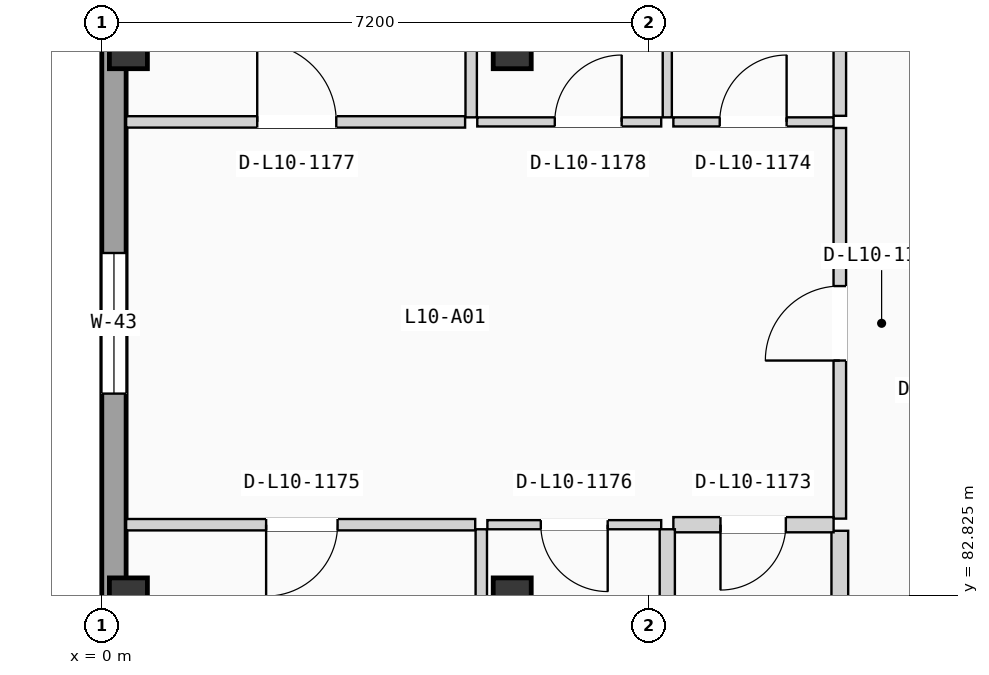
"""IFC4 building model, lengths in metres.
Left out: names, types, materials, properties, quantities, classifications, styles, units other than length and angle.
Written with IfcOpenShell. Run it as: python <this file> out.ifc"""

import sys

from ifc_helpers import new_model, si_unit, direction, frame, frame_2d, origin, origin_2d, place, context, subcontext, project, spatial, rectangle, extrude, element, fill, save


model = new_model("IFC4")
c1 = context("Model", 3, precision=1e-05, world=origin(), true_north=direction((0.0, 1.0)))
c2 = subcontext(c1, "Body", "Model", "MODEL_VIEW")
j1 = project(units=[si_unit("LENGTHUNIT", "METRE"), si_unit("PLANEANGLEUNIT", "RADIAN")], contexts=[c1])
p1 = place(None, origin())
s1 = spatial("IfcSite", under=j1, at=p1, CompositionType="ELEMENT")
p2 = place(p1, origin())
s2 = spatial("IfcBuilding", under=s1, at=p2, CompositionType="ELEMENT")
p3 = place(p2, frame((0.0, 0.0, 34.125)))
s3 = spatial("IfcBuildingStorey", under=s2, at=p3, CompositionType="ELEMENT", Elevation=34.125)
for number, where, z_axis, x_axis in (
    (1, (0.35, 82.8, 0.0), (0.0, 0.0, 1.0), (1.0, 0.0, 0.0)),
    (2, (0.35, 90.0, 0.0), (0.0, 0.0, 1.0), (1.0, 0.0, 0.0)),
    (3, (5.4, 82.8, 0.0), (0.0, 0.0, 1.0), (1.0, 0.0, 0.0)),
    (4, (5.4, 90.0, 0.0), (0.0, 0.0, 1.0), (1.0, 0.0, 0.0)),
):
    element("IfcColumn", number, at=place(p3, frame(where, z_axis=z_axis, x_axis=x_axis)), inside=s3, PredefinedType="COLUMN", context=c2, shape_type="SweptSolid", body=[
        extrude(rectangle(XDim=0.5, YDim=0.5, at=origin_2d()), origin(), (0.0, 0.0, 1.0), 3.15),
    ])
p4 = place(p3, frame((0.16, 68.72, 0.0), z_axis=(0.0, 0.0, 1.0), x_axis=(0.0, 1.0, 0.0)))
e5 = element("IfcWall", 5, at=p4, inside=s3, PredefinedType="SOLIDWALL", context=c2, shape_type="SweptSolid", body=[
    extrude(rectangle(XDim=49.76, YDim=0.32, at=frame_2d((24.88, 0.0))), origin(), (0.0, 0.0, 1.0), 2.89),
])
p5 = place(p4, frame((16.755, 0.0, 0.705)))
e6 = element("IfcOpeningElement", 6, at=p5, cuts=e5, PredefinedType="OPENING", context=c2, shape_type="SweptSolid", body=[
    extrude(rectangle(XDim=1.85, YDim=1.5, at=frame_2d((0.925, 0.75))), frame((0.0, 0.17, 0.0), z_axis=(0.0, -1.0, 0.0), x_axis=(1.0, 0.0, 0.0)), (0.0, 0.0, 1.0), 0.34),
])
p6 = place(p4, frame((9.62, 0.0, 0.555)))
e7 = element("IfcOpeningElement", 7, at=p6, cuts=e5, PredefinedType="OPENING", context=c2, shape_type="SweptSolid", body=[
    extrude(rectangle(XDim=1.85, YDim=1.65, at=frame_2d((0.925, 0.825))), frame((0.0, 0.17, 0.0), z_axis=(0.0, -1.0, 0.0), x_axis=(1.0, 0.0, 0.0)), (0.0, 0.0, 1.0), 0.34),
])
p7 = place(p4, frame((24.405, 0.0, 0.85)))
e8 = element("IfcOpeningElement", 8, at=p7, cuts=e5, PredefinedType="OPENING", context=c2, shape_type="SweptSolid", body=[
    extrude(rectangle(XDim=0.95, YDim=1.2, at=frame_2d((0.475, 0.6))), frame((0.0, 0.17, 0.0), z_axis=(0.0, -1.0, 0.0), x_axis=(1.0, 0.0, 0.0)), (0.0, 0.0, 1.0), 0.34),
])
p8 = place(p4, frame((33.159, 0.0, 0.9)))
e9 = element("IfcOpeningElement", 9, at=p8, cuts=e5, PredefinedType="OPENING", context=c2, shape_type="SweptSolid", body=[
    extrude(rectangle(XDim=2.0, YDim=1.2, at=frame_2d((1.0, 0.6))), frame((0.0, 0.17, 0.0), z_axis=(0.0, -1.0, 0.0), x_axis=(1.0, 0.0, 0.0)), (0.0, 0.0, 1.0), 0.34),
])
p9 = place(p4, frame((29.749, 0.0, 0.855)))
e10 = element("IfcOpeningElement", 10, at=p9, cuts=e5, PredefinedType="OPENING", context=c2, shape_type="SweptSolid", body=[
    extrude(rectangle(XDim=2.0, YDim=1.35, at=frame_2d((1.0, 0.675))), frame((0.0, 0.17, 0.0), z_axis=(0.0, -1.0, 0.0), x_axis=(1.0, 0.0, 0.0)), (0.0, 0.0, 1.0), 0.34),
])
p10 = place(p4, frame((39.352, 0.0, 0.705)))
e11 = element("IfcOpeningElement", 11, at=p10, cuts=e5, PredefinedType="OPENING", context=c2, shape_type="SweptSolid", body=[
    extrude(rectangle(XDim=2.0, YDim=1.5, at=frame_2d((1.0, 0.75))), frame((0.0, 0.17, 0.0), z_axis=(0.0, -1.0, 0.0), x_axis=(1.0, 0.0, 0.0)), (0.0, 0.0, 1.0), 0.34),
])
p11 = place(p3, frame((9.71, 83.83, 0.0), z_axis=(0.0, 0.0, 1.0), x_axis=(0.0, 1.0, 0.0)))
e12 = element("IfcWall", 12, at=p11, inside=s3, PredefinedType="PARTITIONING", context=c2, shape_type="SweptSolid", body=[
    extrude(rectangle(XDim=5.14, YDim=0.165, at=frame_2d((2.57, 0.0))), origin(), (0.0, 0.0, 1.0), 2.87),
])
p12 = place(p11, frame((2.08, 0.0, 0.0)))
e13 = element("IfcOpeningElement", 13, at=p12, cuts=e12, PredefinedType="OPENING", context=c2, shape_type="SweptSolid", body=[
    extrude(rectangle(XDim=0.98, YDim=2.08, at=frame_2d((0.49, 1.04))), frame((0.0, 0.093, 0.0), z_axis=(0.0, -1.0, 0.0), x_axis=(1.0, 0.0, 0.0)), (0.0, 0.0, 1.0), 0.185),
])
p13 = place(p3, frame((9.71, 76.0, 0.0), z_axis=(0.0, 0.0, 1.0), x_axis=(0.0, 1.0, 0.0)))
e14 = element("IfcWall", 14, at=p13, inside=s3, PredefinedType="PLUMBINGWALL", context=c2, shape_type="SweptSolid", body=[
    extrude(rectangle(XDim=7.67, YDim=0.22, at=frame_2d((3.835, 0.0))), origin(), (0.0, 0.0, 1.0), 2.87),
])
p14 = place(p3, frame((9.71, 89.13, 0.0), z_axis=(0.0, 0.0, 1.0), x_axis=(0.0, 1.0, 0.0)))
e15 = element("IfcWall", 15, at=p14, inside=s3, PredefinedType="PARTITIONING", context=c2, shape_type="SweptSolid", body=[
    extrude(rectangle(XDim=7.9, YDim=0.165, at=frame_2d((3.95, 0.0))), origin(), (0.0, 0.0, 1.0), 2.87),
])
p15 = place(p3, frame((7.52, 83.75, 0.0), z_axis=(0.0, 0.0, 1.0), x_axis=(1.0, 0.0, 0.0)))
e16 = element("IfcWall", 16, at=p15, inside=s3, PredefinedType="PLUMBINGWALL", context=c2, shape_type="SweptSolid", body=[
    extrude(rectangle(XDim=2.108, YDim=0.2, at=frame_2d((1.054, 0.0))), origin(), (0.0, 0.0, 1.0), 2.87),
])
p16 = place(p15, frame((0.62, 0.0, 0.0)))
e17 = element("IfcOpeningElement", 17, at=p16, cuts=e16, PredefinedType="OPENING", context=c2, shape_type="SweptSolid", body=[
    extrude(rectangle(XDim=0.86, YDim=2.0, at=frame_2d((0.43, 1.0))), frame((0.0, 0.11, 0.0), z_axis=(0.0, -1.0, 0.0), x_axis=(1.0, 0.0, 0.0)), (0.0, 0.0, 1.0), 0.22),
])
p17 = place(p3, frame((7.52, 89.05, 0.0), z_axis=(0.0, 0.0, 1.0), x_axis=(1.0, 0.0, 0.0)))
e18 = element("IfcWall", 18, at=p17, inside=s3, PredefinedType="PARTITIONING", context=c2, shape_type="SweptSolid", body=[
    extrude(rectangle(XDim=2.108, YDim=0.12, at=frame_2d((1.054, 0.0))), origin(), (0.0, 0.0, 1.0), 2.87),
])
p18 = place(p17, frame((0.61, 0.0, 0.0)))
e19 = element("IfcOpeningElement", 19, at=p18, cuts=e18, PredefinedType="OPENING", context=c2, shape_type="SweptSolid", body=[
    extrude(rectangle(XDim=0.88, YDim=2.02, at=frame_2d((0.44, 1.01))), frame((0.0, 0.07, 0.0), z_axis=(0.0, -1.0, 0.0), x_axis=(1.0, 0.0, 0.0)), (0.0, 0.0, 1.0), 0.14),
])
p19 = place(p3, frame((0.32, 83.75, 0.0), z_axis=(0.0, 0.0, 1.0), x_axis=(1.0, 0.0, 0.0)))
e20 = element("IfcWall", 20, at=p19, inside=s3, PredefinedType="PARTITIONING", context=c2, shape_type="SweptSolid", body=[
    extrude(rectangle(XDim=4.593, YDim=0.15, at=frame_2d((2.296, 0.0))), origin(), (0.0, 0.0, 1.0), 2.87),
])
p20 = place(p19, frame((1.842, 0.0, 0.0)))
e21 = element("IfcOpeningElement", 21, at=p20, cuts=e20, PredefinedType="OPENING", context=c2, shape_type="SweptSolid", body=[
    extrude(rectangle(XDim=0.94, YDim=2.06, at=frame_2d((0.47, 1.03))), frame((0.0, 0.085, 0.0), z_axis=(0.0, -1.0, 0.0), x_axis=(1.0, 0.0, 0.0)), (0.0, 0.0, 1.0), 0.17),
])
p21 = place(p3, frame((5.073, 83.75, 0.0), z_axis=(0.0, 0.0, 1.0), x_axis=(1.0, 0.0, 0.0)))
e22 = element("IfcWall", 22, at=p21, inside=s3, PredefinedType="PARTITIONING", context=c2, shape_type="SweptSolid", body=[
    extrude(rectangle(XDim=2.287, YDim=0.12, at=frame_2d((1.144, 0.0))), origin(), (0.0, 0.0, 1.0), 2.87),
])
p22 = place(p21, frame((0.703, 0.0, 0.0)))
e23 = element("IfcOpeningElement", 23, at=p22, cuts=e22, PredefinedType="OPENING", context=c2, shape_type="SweptSolid", body=[
    extrude(rectangle(XDim=0.88, YDim=2.02, at=frame_2d((0.44, 1.01))), frame((0.0, 0.07, 0.0), z_axis=(0.0, -1.0, 0.0), x_axis=(1.0, 0.0, 0.0)), (0.0, 0.0, 1.0), 0.14),
])
p23 = place(p3, frame((0.32, 89.05, 0.0), z_axis=(0.0, 0.0, 1.0), x_axis=(1.0, 0.0, 0.0)))
e24 = element("IfcWall", 24, at=p23, inside=s3, PredefinedType="PARTITIONING", context=c2, shape_type="SweptSolid", body=[
    extrude(rectangle(XDim=4.46, YDim=0.15, at=frame_2d((2.23, 0.0))), origin(), (0.0, 0.0, 1.0), 2.87),
])
p24 = place(p23, frame((1.725, 0.0, 0.0)))
e25 = element("IfcOpeningElement", 25, at=p24, cuts=e24, PredefinedType="OPENING", context=c2, shape_type="SweptSolid", body=[
    extrude(rectangle(XDim=1.04, YDim=2.08, at=frame_2d((0.52, 1.04))), frame((0.0, 0.085, 0.0), z_axis=(0.0, -1.0, 0.0), x_axis=(1.0, 0.0, 0.0)), (0.0, 0.0, 1.0), 0.17),
])
p25 = place(p3, frame((4.94, 89.05, 0.0), z_axis=(0.0, 0.0, 1.0), x_axis=(1.0, 0.0, 0.0)))
e26 = element("IfcWall", 26, at=p25, inside=s3, PredefinedType="PARTITIONING", context=c2, shape_type="SweptSolid", body=[
    extrude(rectangle(XDim=2.42, YDim=0.12, at=frame_2d((1.21, 0.0))), origin(), (0.0, 0.0, 1.0), 2.87),
])
p26 = place(p25, frame((1.02, 0.0, 0.0)))
e27 = element("IfcOpeningElement", 27, at=p26, cuts=e26, PredefinedType="OPENING", context=c2, shape_type="SweptSolid", body=[
    extrude(rectangle(XDim=0.88, YDim=2.02, at=frame_2d((0.44, 1.01))), frame((0.0, 0.07, 0.0), z_axis=(0.0, -1.0, 0.0), x_axis=(1.0, 0.0, 0.0)), (0.0, 0.0, 1.0), 0.14),
])
p27 = place(p3, frame((7.44, 76.0, 0.0), z_axis=(0.0, 0.0, 1.0), x_axis=(0.0, 1.0, 0.0)))
e28 = element("IfcWall", 28, at=p27, inside=s3, PredefinedType="PLUMBINGWALL", context=c2, shape_type="SweptSolid", body=[
    extrude(rectangle(XDim=7.69, YDim=0.2, at=frame_2d((3.845, 0.0))), origin(), (0.0, 0.0, 1.0), 2.87),
])
p28 = place(p27, frame((3.41, 0.0, 0.0)))
e29 = element("IfcOpeningElement", 29, at=p28, cuts=e28, PredefinedType="OPENING", context=c2, shape_type="SweptSolid", body=[
    extrude(rectangle(XDim=0.85, YDim=2.01, at=frame_2d((0.425, 1.005))), frame((0.0, 0.11, 0.0), z_axis=(0.0, -1.0, 0.0), x_axis=(1.0, 0.0, 0.0)), (0.0, 0.0, 1.0), 0.22),
])
p29 = place(p3, frame((7.44, 89.11, 0.0), z_axis=(0.0, 0.0, 1.0), x_axis=(0.0, 1.0, 0.0)))
e30 = element("IfcWall", 30, at=p29, inside=s3, PredefinedType="PARTITIONING", context=c2, shape_type="SweptSolid", body=[
    extrude(rectangle(XDim=7.92, YDim=0.12, at=frame_2d((3.96, 0.0))), origin(), (0.0, 0.0, 1.0), 2.87),
])
p30 = place(p3, frame((4.993, 76.0, 0.0), z_axis=(0.0, 0.0, 1.0), x_axis=(0.0, 1.0, 0.0)))
e31 = element("IfcWall", 31, at=p30, inside=s3, PredefinedType="PARTITIONING", context=c2, shape_type="SweptSolid", body=[
    extrude(rectangle(XDim=7.69, YDim=0.15, at=frame_2d((3.845, 0.0))), origin(), (0.0, 0.0, 1.0), 2.87),
])
p31 = place(p3, frame((4.86, 89.11, 0.0), z_axis=(0.0, 0.0, 1.0), x_axis=(0.0, 1.0, 0.0)))
e32 = element("IfcWall", 32, at=p31, inside=s3, PredefinedType="PARTITIONING", context=c2, shape_type="SweptSolid", body=[
    extrude(rectangle(XDim=7.92, YDim=0.15, at=frame_2d((3.96, 0.0))), origin(), (0.0, 0.0, 1.0), 2.87),
])
p32 = place(p5, origin())
e33 = element("IfcWindow", 33, at=p32, inside=s3, PartitioningType="DOUBLE_PANEL_VERTICAL", PredefinedType="WINDOW", context=c2, shape_type="SweptSolid", body=[
    extrude(rectangle(XDim=1.85, YDim=1.5, at=frame_2d((0.925, 0.75))), frame((0.0, 0.03, 0.0), z_axis=(0.0, -1.0, 0.0), x_axis=(1.0, 0.0, 0.0)), (0.0, 0.0, 1.0), 0.06),
])
fill(e6, e33)
p33 = place(p12, origin())
e34 = element("IfcDoor", 34, at=p33, inside=s3, OperationType="SINGLE_SWING_LEFT", PredefinedType="DOOR", context=c2, shape_type="SweptSolid", body=[
    extrude(rectangle(XDim=0.98, YDim=2.08, at=frame_2d((0.49, 1.04))), frame((0.0, 0.025, 0.0), z_axis=(0.0, -1.0, 0.0), x_axis=(1.0, 0.0, 0.0)), (0.0, 0.0, 1.0), 0.05),
])
fill(e13, e34)
p34 = place(p16, frame((0.86, 0.0, 0.0), z_axis=(0.0, 0.0, 1.0), x_axis=(-1.0, 0.0, 0.0)))
e35 = element("IfcDoor", 35, at=p34, inside=s3, OperationType="SINGLE_SWING_LEFT", PredefinedType="DOOR", context=c2, shape_type="SweptSolid", body=[
    extrude(rectangle(XDim=0.86, YDim=2.0, at=frame_2d((0.43, 1.0))), frame((0.0, 0.025, 0.0), z_axis=(0.0, -1.0, 0.0), x_axis=(1.0, 0.0, 0.0)), (0.0, 0.0, 1.0), 0.05),
])
fill(e17, e35)
p35 = place(p18, origin())
e36 = element("IfcDoor", 36, at=p35, inside=s3, OperationType="SINGLE_SWING_RIGHT", PredefinedType="DOOR", context=c2, shape_type="SweptSolid", body=[
    extrude(rectangle(XDim=0.88, YDim=2.02, at=frame_2d((0.44, 1.01))), frame((0.0, 0.025, 0.0), z_axis=(0.0, -1.0, 0.0), x_axis=(1.0, 0.0, 0.0)), (0.0, 0.0, 1.0), 0.05),
])
fill(e19, e36)
p36 = place(p20, frame((0.94, 0.0, 0.0), z_axis=(0.0, 0.0, 1.0), x_axis=(-1.0, 0.0, 0.0)))
e37 = element("IfcDoor", 37, at=p36, inside=s3, OperationType="SINGLE_SWING_LEFT", PredefinedType="DOOR", context=c2, shape_type="SweptSolid", body=[
    extrude(rectangle(XDim=0.94, YDim=2.06, at=frame_2d((0.47, 1.03))), frame((0.0, 0.025, 0.0), z_axis=(0.0, -1.0, 0.0), x_axis=(1.0, 0.0, 0.0)), (0.0, 0.0, 1.0), 0.05),
])
fill(e21, e37)
p37 = place(p22, frame((0.88, 0.0, 0.0), z_axis=(0.0, 0.0, 1.0), x_axis=(-1.0, 0.0, 0.0)))
e38 = element("IfcDoor", 38, at=p37, inside=s3, OperationType="SINGLE_SWING_RIGHT", PredefinedType="DOOR", context=c2, shape_type="SweptSolid", body=[
    extrude(rectangle(XDim=0.88, YDim=2.02, at=frame_2d((0.44, 1.01))), frame((0.0, 0.025, 0.0), z_axis=(0.0, -1.0, 0.0), x_axis=(1.0, 0.0, 0.0)), (0.0, 0.0, 1.0), 0.05),
])
fill(e23, e38)
p38 = place(p24, origin())
e39 = element("IfcDoor", 39, at=p38, inside=s3, OperationType="SINGLE_SWING_LEFT", PredefinedType="DOOR", context=c2, shape_type="SweptSolid", body=[
    extrude(rectangle(XDim=1.04, YDim=2.08, at=frame_2d((0.52, 1.04))), frame((0.0, 0.025, 0.0), z_axis=(0.0, -1.0, 0.0), x_axis=(1.0, 0.0, 0.0)), (0.0, 0.0, 1.0), 0.05),
])
fill(e25, e39)
p39 = place(p26, origin())
e40 = element("IfcDoor", 40, at=p39, inside=s3, OperationType="SINGLE_SWING_RIGHT", PredefinedType="DOOR", context=c2, shape_type="SweptSolid", body=[
    extrude(rectangle(XDim=0.88, YDim=2.02, at=frame_2d((0.44, 1.01))), frame((0.0, 0.025, 0.0), z_axis=(0.0, -1.0, 0.0), x_axis=(1.0, 0.0, 0.0)), (0.0, 0.0, 1.0), 0.05),
])
fill(e27, e40)
save(model, sys.argv[1])
